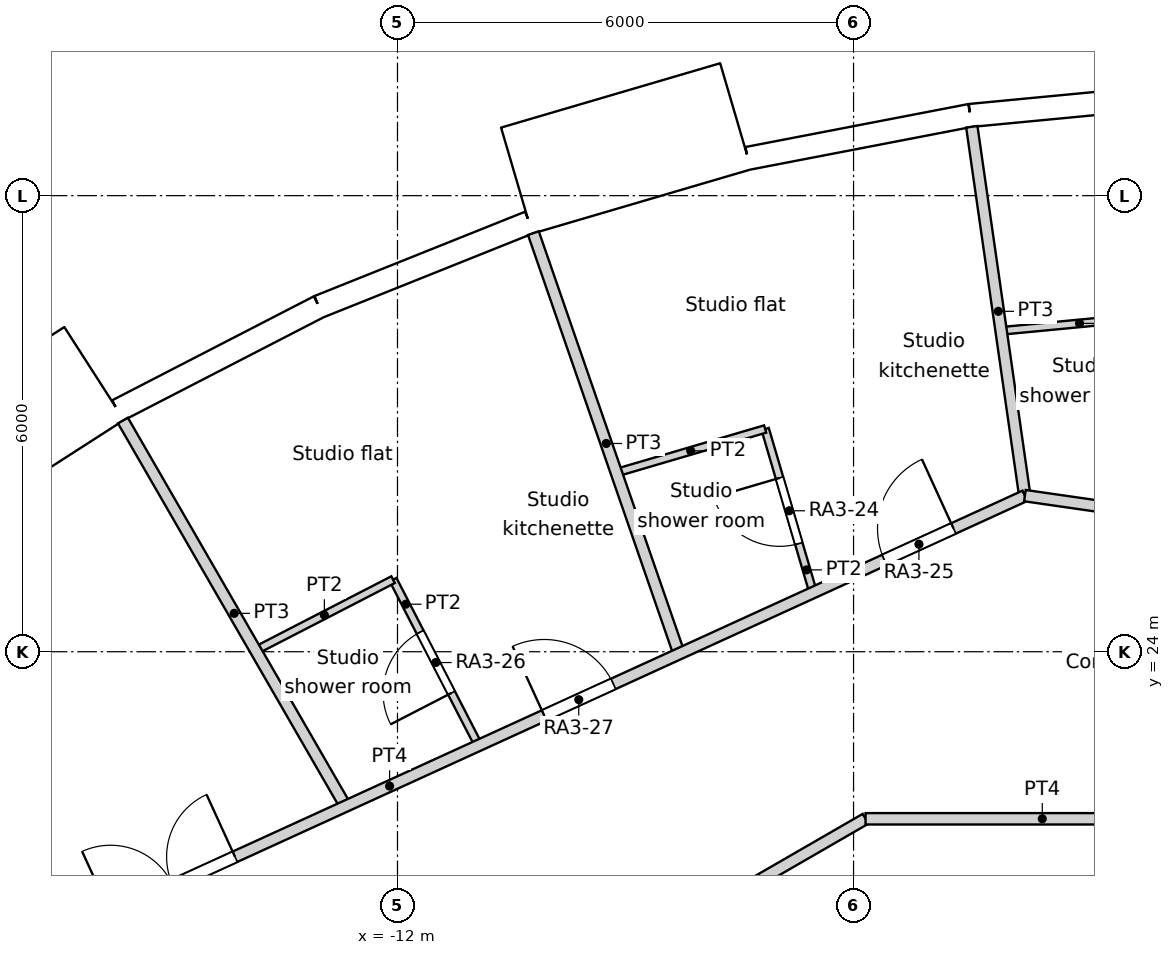
"""IFC4 building model, lengths in metres.
Left out: names, types, materials, properties, quantities, classifications, styles, units other than length and angle.
Written with IfcOpenShell. Run it as: python <this file> out.ifc"""

import sys

from ifc_helpers import new_model, si_unit, direction, frame, frame_2d, origin, origin_2d, place, context, subcontext, project, spatial, rectangle, circle, extrude, element, fill, save


model = new_model("IFC4")
c1 = context("Model", 3, precision=1e-05, world=origin(), true_north=direction((0.0, 1.0)))
c2 = subcontext(c1, "Body", "Model", "MODEL_VIEW")
j1 = project(units=[si_unit("LENGTHUNIT", "METRE"), si_unit("PLANEANGLEUNIT", "RADIAN")], contexts=[c1])
p1 = place(None, origin())
s1 = spatial("IfcSite", under=j1, at=p1, CompositionType="ELEMENT")
p2 = place(p1, origin())
s2 = spatial("IfcBuilding", under=s1, at=p2, CompositionType="ELEMENT")
p3 = place(p2, frame((0.0, 0.0, 49.8)))
s3 = spatial("IfcBuildingStorey", under=s2, at=p3, CompositionType="ELEMENT", Elevation=49.8)
for number, where, z_axis, x_axis in (
    (1, (-4.309, 29.966, 0.0), (0.0, 0.0, 1.0), (1.0, 0.0, 0.0)),
    (2, (-9.902, 28.61, 0.0), (0.0, 0.0, 1.0), (1.0, 0.0, 0.0)),
    (3, (-15.137, 26.219, 0.0), (0.0, 0.0, 1.0), (1.0, 0.0, 0.0)),
):
    element("IfcColumn", number, at=place(p3, frame(where, z_axis=z_axis, x_axis=x_axis)), inside=s3, PredefinedType="COLUMN", context=c2, shape_type="SweptSolid", body=[
        extrude(circle(Radius=0.7, at=origin_2d()), origin(), (0.0, 0.0, 1.0), 3.6),
    ])
for number, where, z_axis, x_axis in (
    (4, (-7.04, 23.516, 0.0), (0.0, 0.0, 1.0), (1.0, 0.0, 0.0)),
    (5, (-12.274, 21.259, 0.0), (0.0, 0.0, 1.0), (1.0, 0.0, 0.0)),
):
    element("IfcColumn", number, at=place(p3, frame(where, z_axis=z_axis, x_axis=x_axis)), inside=s3, PredefinedType="COLUMN", context=c2, shape_type="SweptSolid", body=[
        extrude(circle(Radius=0.75, at=origin_2d()), origin(), (0.0, 0.0, 1.0), 3.6),
    ])
p4 = place(p3, frame((-1.499, 31.338, 0.0), z_axis=(0.0, 0.0, 1.0), x_axis=(-0.995473351551, -0.095041077185, 0.0)))
e6 = element("IfcWall", 6, at=p4, inside=s3, PredefinedType="SOLIDWALL", context=c2, shape_type="SweptSolid", body=[
    extrude(rectangle(XDim=2.98, YDim=0.3, at=frame_2d((1.49, 0.0))), origin(), (0.0, 0.0, 1.0), 3.15),
])
p5 = place(p4, frame((1.49, 0.0, 1.55)))
e7 = element("IfcOpeningElement", 7, at=p5, cuts=e6, PredefinedType="OPENING", context=c2, shape_type="SweptSolid", body=[
    extrude(circle(Radius=0.9, at=origin_2d()), frame((0.0, 0.16, 0.0), z_axis=(0.0, -1.0, 0.0), x_axis=(1.0, 0.0, 0.0)), (0.0, 0.0, 1.0), 0.32),
])
p6 = place(p3, frame((-4.465, 31.055, 0.0), z_axis=(0.0, 0.0, 1.0), x_axis=(-0.981924535406, -0.189272836848, 0.0)))
e8 = element("IfcWall", 8, at=p6, inside=s3, PredefinedType="SOLIDWALL", context=c2, shape_type="SweptSolid", body=[
    extrude(rectangle(XDim=2.98, YDim=0.3, at=frame_2d((1.49, 0.0))), origin(), (0.0, 0.0, 1.0), 3.15),
])
p7 = place(p6, frame((1.49, 0.0, 1.55)))
e9 = element("IfcOpeningElement", 9, at=p7, cuts=e8, PredefinedType="OPENING", context=c2, shape_type="SweptSolid", body=[
    extrude(circle(Radius=0.9, at=origin_2d()), frame((0.0, 0.16, 0.0), z_axis=(0.0, -1.0, 0.0), x_axis=(1.0, 0.0, 0.0)), (0.0, 0.0, 1.0), 0.32),
])
p8 = place(p3, frame((-7.552, 31.044, -0.45), z_axis=(0.0, 0.0, 1.0), x_axis=(-0.959489813418, -0.281743319258, 0.0)))
e10 = element("IfcWall", 10, at=p8, inside=s3, PredefinedType="ELEMENTEDWALL", context=c2, shape_type="SweptSolid", body=[
    extrude(rectangle(XDim=3.0, YDim=1.45, at=frame_2d((1.5, 0.0))), origin(), (0.0, 0.0, 1.0), 3.6),
])
p9 = place(p8, frame((1.5, 0.0, 2.0)))
e11 = element("IfcOpeningElement", 11, at=p9, cuts=e10, PredefinedType="OPENING", context=c2, shape_type="SweptSolid", body=[
    extrude(circle(Radius=0.9, at=origin_2d()), frame((0.0, 0.735, 0.0), z_axis=(0.0, -1.0, 0.0), x_axis=(1.0, 0.0, 0.0)), (0.0, 0.0, 1.0), 1.47),
])
p10 = place(p3, frame((-10.267, 29.646, 0.0), z_axis=(0.0, 0.0, 1.0), x_axis=(-0.928403213937, -0.371574316054, 0.0)))
e12 = element("IfcWall", 12, at=p10, inside=s3, PredefinedType="SOLIDWALL", context=c2, shape_type="SweptSolid", body=[
    extrude(rectangle(XDim=2.98, YDim=0.3, at=frame_2d((1.49, 0.0))), origin(), (0.0, 0.0, 1.0), 3.15),
])
p11 = place(p10, frame((1.49, 0.0, 1.55)))
e13 = element("IfcOpeningElement", 13, at=p11, cuts=e12, PredefinedType="OPENING", context=c2, shape_type="SweptSolid", body=[
    extrude(circle(Radius=0.9, at=origin_2d()), frame((0.0, 0.16, 0.0), z_axis=(0.0, -1.0, 0.0), x_axis=(1.0, 0.0, 0.0)), (0.0, 0.0, 1.0), 0.32),
])
p12 = place(p3, frame((-13.033, 28.539, 0.0), z_axis=(0.0, 0.0, 1.0), x_axis=(-0.888819853856, -0.458256770153, 0.0)))
e14 = element("IfcWall", 14, at=p12, inside=s3, PredefinedType="SOLIDWALL", context=c2, shape_type="SweptSolid", body=[
    extrude(rectangle(XDim=2.98, YDim=0.3, at=frame_2d((1.49, 0.0))), origin(), (0.0, 0.0, 1.0), 3.15),
])
p13 = place(p12, frame((1.49, 0.0, 1.55)))
e15 = element("IfcOpeningElement", 15, at=p13, cuts=e14, PredefinedType="OPENING", context=c2, shape_type="SweptSolid", body=[
    extrude(circle(Radius=0.9, at=origin_2d()), frame((0.0, 0.16, 0.0), z_axis=(0.0, -1.0, 0.0), x_axis=(1.0, 0.0, 0.0)), (0.0, 0.0, 1.0), 0.32),
])
p14 = place(p3, frame((-15.992, 27.659, -0.45), z_axis=(0.0, 0.0, 1.0), x_axis=(-0.841223422347, -0.540687667415, 0.0)))
e16 = element("IfcWall", 16, at=p14, inside=s3, PredefinedType="ELEMENTEDWALL", context=c2, shape_type="SweptSolid", body=[
    extrude(rectangle(XDim=3.0, YDim=1.45, at=frame_2d((1.5, 0.0))), origin(), (0.0, 0.0, 1.0), 3.6),
])
p15 = place(p14, frame((1.5, 0.0, 2.0)))
e17 = element("IfcOpeningElement", 17, at=p15, cuts=e16, PredefinedType="OPENING", context=c2, shape_type="SweptSolid", body=[
    extrude(circle(Radius=0.9, at=origin_2d()), frame((0.0, 0.735, 0.0), z_axis=(0.0, -1.0, 0.0), x_axis=(1.0, 0.0, 0.0)), (0.0, 0.0, 1.0), 1.47),
])
p16 = place(p3, frame((-5.842, 21.802, 0.0), z_axis=(0.0, 0.0, 1.0), x_axis=(1.0, 0.0, 0.0)))
e18 = element("IfcWall", 18, at=p16, inside=s3, PredefinedType="PARTITIONING", context=c2, shape_type="SweptSolid", body=[
    extrude(rectangle(XDim=4.65, YDim=0.15, at=frame_2d((2.325, 0.0))), origin(), (0.0, 0.0, 1.0), 3.15),
])
p17 = place(p3, frame((-14.0, 17.092, 0.0), z_axis=(0.0, 0.0, 1.0), x_axis=(0.86602719091, 0.499996904595, 0.0)))
e19 = element("IfcWall", 19, at=p17, inside=s3, PredefinedType="PARTITIONING", context=c2, shape_type="SweptSolid", body=[
    extrude(rectangle(XDim=9.42, YDim=0.15, at=frame_2d((4.71, 0.0))), origin(), (0.0, 0.0, 1.0), 3.15),
])
p18 = place(p3, frame((-3.746, 26.054, 0.0), z_axis=(0.0, 0.0, 1.0), x_axis=(0.989780545379, -0.142598990138, 0.0)))
e20 = element("IfcWall", 20, at=p18, inside=s3, PredefinedType="PARTITIONING", context=c2, shape_type="SweptSolid", body=[
    extrude(rectangle(XDim=14.83, YDim=0.15, at=frame_2d((7.415, 0.0))), origin(), (0.0, 0.0, 1.0), 3.15),
])
p19 = place(p18, frame((10.817, 0.0, 0.0)))
e21 = element("IfcOpeningElement", 21, at=p19, cuts=e20, PredefinedType="OPENING", context=c2, shape_type="SweptSolid", body=[
    extrude(rectangle(XDim=1.0, YDim=2.1, at=frame_2d((0.5, 1.05))), frame((0.0, 0.075, 0.0), z_axis=(0.0, -1.0, 0.0), x_axis=(1.0, 0.0, 0.0)), (0.0, 0.0, 1.0), 0.15),
])
p20 = place(p18, frame((5.954, 0.0, 0.0)))
e22 = element("IfcOpeningElement", 22, at=p20, cuts=e20, PredefinedType="OPENING", context=c2, shape_type="SweptSolid", body=[
    extrude(rectangle(XDim=1.0, YDim=2.1, at=frame_2d((0.5, 1.05))), frame((0.0, 0.075, 0.0), z_axis=(0.0, -1.0, 0.0), x_axis=(1.0, 0.0, 0.0)), (0.0, 0.0, 1.0), 0.15),
])
p21 = place(p18, frame((3.314, 0.0, 0.0)))
e23 = element("IfcOpeningElement", 23, at=p21, cuts=e20, PredefinedType="OPENING", context=c2, shape_type="SweptSolid", body=[
    extrude(rectangle(XDim=1.0, YDim=2.1, at=frame_2d((0.5, 1.05))), frame((0.0, 0.075, 0.0), z_axis=(0.0, -1.0, 0.0), x_axis=(1.0, 0.0, 0.0)), (0.0, 0.0, 1.0), 0.15),
])
p22 = place(p3, frame((-17.234, 19.888, 0.0), z_axis=(0.0, 0.0, 1.0), x_axis=(0.90953867323, 0.415619299238, 0.0)))
e24 = element("IfcWall", 24, at=p22, inside=s3, PredefinedType="PARTITIONING", context=c2, shape_type="SweptSolid", body=[
    extrude(rectangle(XDim=14.829, YDim=0.15, at=frame_2d((7.415, 0.0))), origin(), (0.0, 0.0, 1.0), 3.15),
])
p23 = place(p22, frame((12.797, 0.0, 0.0)))
e25 = element("IfcOpeningElement", 25, at=p23, cuts=e24, PredefinedType="OPENING", context=c2, shape_type="SweptSolid", body=[
    extrude(rectangle(XDim=1.0, YDim=2.1, at=frame_2d((0.5, 1.05))), frame((0.0, 0.075, 0.0), z_axis=(0.0, -1.0, 0.0), x_axis=(1.0, 0.0, 0.0)), (0.0, 0.0, 1.0), 0.15),
])
p24 = place(p22, frame((7.877, 0.0, 0.0)))
e26 = element("IfcOpeningElement", 26, at=p24, cuts=e24, PredefinedType="OPENING", context=c2, shape_type="SweptSolid", body=[
    extrude(rectangle(XDim=1.0, YDim=2.1, at=frame_2d((0.5, 1.05))), frame((0.0, 0.075, 0.0), z_axis=(0.0, -1.0, 0.0), x_axis=(1.0, 0.0, 0.0)), (0.0, 0.0, 1.0), 0.15),
])
p25 = place(p22, frame((1.604, 0.0, 0.0)))
e27 = element("IfcOpeningElement", 27, at=p25, cuts=e24, PredefinedType="OPENING", context=c2, shape_type="SweptSolid", body=[
    extrude(rectangle(XDim=1.8, YDim=2.1, at=frame_2d((0.9, 1.05))), frame((0.0, 0.075, 0.0), z_axis=(0.0, -1.0, 0.0), x_axis=(1.0, 0.0, 0.0)), (0.0, 0.0, 1.0), 0.15),
])
p26 = place(p3, frame((-4.058, 28.221, 0.0), z_axis=(0.0, 0.0, 1.0), x_axis=(0.995466291052, 0.095115000814, 0.0)))
e28 = element("IfcWall", 28, at=p26, inside=s3, PredefinedType="PARTITIONING", context=c2, shape_type="SweptSolid", body=[
    extrude(rectangle(XDim=2.071, YDim=0.1, at=frame_2d((1.036, 0.0))), origin(), (0.0, 0.0, 1.0), 3.15),
])
p27 = place(p3, frame((-4.444, 30.906, 0.0), z_axis=(0.0, 0.0, 1.0), x_axis=(0.142104219222, -0.989851701458, 0.0)))
e29 = element("IfcWall", 29, at=p27, inside=s3, PredefinedType="PARTITIONING", context=c2, shape_type="SweptSolid", body=[
    extrude(rectangle(XDim=4.905, YDim=0.15, at=frame_2d((2.453, 0.0))), origin(), (0.0, 0.0, 1.0), 3.15),
])
p28 = place(p3, frame((-7.163, 26.93, 0.0), z_axis=(0.0, 0.0, 1.0), x_axis=(0.281948165188, -0.959429638977, 0.0)))
e30 = element("IfcWall", 30, at=p28, inside=s3, PredefinedType="PARTITIONING", context=c2, shape_type="SweptSolid", body=[
    extrude(rectangle(XDim=2.242, YDim=0.1, at=frame_2d((1.121, 0.0))), origin(), (0.0, 0.0, 1.0), 3.15),
])
p29 = place(p28, frame((0.671, 0.0, 0.0)))
e31 = element("IfcOpeningElement", 31, at=p29, cuts=e30, PredefinedType="OPENING", context=c2, shape_type="SweptSolid", body=[
    extrude(rectangle(XDim=0.9, YDim=2.04, at=frame_2d((0.45, 1.02))), frame((0.0, 0.05, 0.0), z_axis=(0.0, -1.0, 0.0), x_axis=(1.0, 0.0, 0.0)), (0.0, 0.0, 1.0), 0.1),
])
p30 = place(p3, frame((-9.121, 26.355, 0.0), z_axis=(0.0, 0.0, 1.0), x_axis=(0.95948923736, 0.281745281045, 0.0)))
e32 = element("IfcWall", 32, at=p30, inside=s3, PredefinedType="PARTITIONING", context=c2, shape_type="SweptSolid", body=[
    extrude(rectangle(XDim=2.041, YDim=0.1, at=frame_2d((1.021, 0.0))), origin(), (0.0, 0.0, 1.0), 3.15),
])
p31 = place(p3, frame((-10.212, 29.507, 0.0), z_axis=(0.0, 0.0, 1.0), x_axis=(0.327223665968, -0.944946915139, 0.0)))
e33 = element("IfcWall", 33, at=p31, inside=s3, PredefinedType="PARTITIONING", context=c2, shape_type="SweptSolid", body=[
    extrude(rectangle(XDim=5.857, YDim=0.15, at=frame_2d((2.928, 0.0))), origin(), (0.0, 0.0, 1.0), 3.15),
])
p32 = place(p3, frame((-12.058, 24.948, 0.0), z_axis=(0.0, 0.0, 1.0), x_axis=(0.458287904527, -0.888803800939, 0.0)))
e34 = element("IfcWall", 34, at=p32, inside=s3, PredefinedType="PARTITIONING", context=c2, shape_type="SweptSolid", body=[
    extrude(rectangle(XDim=2.453, YDim=0.1, at=frame_2d((1.226, 0.0))), origin(), (0.0, 0.0, 1.0), 3.15),
])
p33 = place(p32, frame((0.777, 0.0, 0.0)))
e35 = element("IfcOpeningElement", 35, at=p33, cuts=e34, PredefinedType="OPENING", context=c2, shape_type="SweptSolid", body=[
    extrude(rectangle(XDim=0.9, YDim=2.04, at=frame_2d((0.45, 1.02))), frame((0.0, 0.05, 0.0), z_axis=(0.0, -1.0, 0.0), x_axis=(1.0, 0.0, 0.0)), (0.0, 0.0, 1.0), 0.1),
])
p34 = place(p3, frame((-13.866, 24.016, 0.0), z_axis=(0.0, 0.0, 1.0), x_axis=(0.888861985525, 0.45817504372, 0.0)))
e36 = element("IfcWall", 36, at=p34, inside=s3, PredefinedType="PARTITIONING", context=c2, shape_type="SweptSolid", body=[
    extrude(rectangle(XDim=2.034, YDim=0.1, at=frame_2d((1.017, 0.0))), origin(), (0.0, 0.0, 1.0), 3.15),
])
p35 = place(p3, frame((-15.612, 27.041, 0.0), z_axis=(0.0, 0.0, 1.0), x_axis=(0.499905289531, -0.866080077994, 0.0)))
e37 = element("IfcWall", 37, at=p35, inside=s3, PredefinedType="PARTITIONING", context=c2, shape_type="SweptSolid", body=[
    extrude(rectangle(XDim=5.857, YDim=0.15, at=frame_2d((2.928, 0.0))), origin(), (0.0, 0.0, 1.0), 3.15),
])
p36 = place(p5, origin())
e38 = element("IfcWindow", 38, at=p36, inside=s3, PartitioningType="SINGLE_PANEL", PredefinedType="WINDOW", context=c2, shape_type="SweptSolid", body=[
    extrude(circle(Radius=0.9, at=origin_2d()), frame((0.0, 0.12, 0.0), z_axis=(0.0, -1.0, 0.0), x_axis=(1.0, 0.0, 0.0)), (0.0, 0.0, 1.0), 0.1),
])
fill(e7, e38)
p37 = place(p7, origin())
e39 = element("IfcWindow", 39, at=p37, inside=s3, PartitioningType="SINGLE_PANEL", PredefinedType="WINDOW", context=c2, shape_type="SweptSolid", body=[
    extrude(circle(Radius=0.9, at=origin_2d()), frame((0.0, 0.12, 0.0), z_axis=(0.0, -1.0, 0.0), x_axis=(1.0, 0.0, 0.0)), (0.0, 0.0, 1.0), 0.1),
])
fill(e9, e39)
p38 = place(p9, origin())
e40 = element("IfcWindow", 40, at=p38, inside=s3, PartitioningType="SINGLE_PANEL", PredefinedType="WINDOW", context=c2, shape_type="SweptSolid", body=[
    extrude(circle(Radius=0.9, at=origin_2d()), frame((0.0, 0.695, 0.0), z_axis=(0.0, -1.0, 0.0), x_axis=(1.0, 0.0, 0.0)), (0.0, 0.0, 1.0), 0.1),
])
fill(e11, e40)
p39 = place(p11, origin())
e41 = element("IfcWindow", 41, at=p39, inside=s3, PartitioningType="SINGLE_PANEL", PredefinedType="WINDOW", context=c2, shape_type="SweptSolid", body=[
    extrude(circle(Radius=0.9, at=origin_2d()), frame((0.0, 0.12, 0.0), z_axis=(0.0, -1.0, 0.0), x_axis=(1.0, 0.0, 0.0)), (0.0, 0.0, 1.0), 0.1),
])
fill(e13, e41)
p40 = place(p13, origin())
e42 = element("IfcWindow", 42, at=p40, inside=s3, PartitioningType="SINGLE_PANEL", PredefinedType="WINDOW", context=c2, shape_type="SweptSolid", body=[
    extrude(circle(Radius=0.9, at=origin_2d()), frame((0.0, 0.12, 0.0), z_axis=(0.0, -1.0, 0.0), x_axis=(1.0, 0.0, 0.0)), (0.0, 0.0, 1.0), 0.1),
])
fill(e15, e42)
p41 = place(p15, origin())
e43 = element("IfcWindow", 43, at=p41, inside=s3, PartitioningType="SINGLE_PANEL", PredefinedType="WINDOW", context=c2, shape_type="SweptSolid", body=[
    extrude(circle(Radius=0.9, at=origin_2d()), frame((0.0, 0.695, 0.0), z_axis=(0.0, -1.0, 0.0), x_axis=(1.0, 0.0, 0.0)), (0.0, 0.0, 1.0), 0.1),
])
fill(e17, e43)
p42 = place(p29, origin())
e44 = element("IfcDoor", 44, at=p42, inside=s3, OperationType="SINGLE_SWING_RIGHT", PredefinedType="DOOR", context=c2, shape_type="SweptSolid", body=[
    extrude(rectangle(XDim=0.9, YDim=2.04, at=frame_2d((0.45, 1.02))), frame((0.0, 0.025, 0.0), z_axis=(0.0, -1.0, 0.0), x_axis=(1.0, 0.0, 0.0)), (0.0, 0.0, 1.0), 0.05),
])
fill(e31, e44)
p43 = place(p23, origin())
e45 = element("IfcDoor", 45, at=p43, inside=s3, OperationType="SINGLE_SWING_RIGHT", PredefinedType="DOOR", context=c2, shape_type="SweptSolid", body=[
    extrude(rectangle(XDim=1.0, YDim=2.1, at=frame_2d((0.5, 1.05))), frame((0.0, 0.025, 0.0), z_axis=(0.0, -1.0, 0.0), x_axis=(1.0, 0.0, 0.0)), (0.0, 0.0, 1.0), 0.05),
])
fill(e25, e45)
p44 = place(p33, origin())
e46 = element("IfcDoor", 46, at=p44, inside=s3, OperationType="SINGLE_SWING_LEFT", PredefinedType="DOOR", context=c2, shape_type="SweptSolid", body=[
    extrude(rectangle(XDim=0.9, YDim=2.04, at=frame_2d((0.45, 1.02))), frame((0.0, 0.025, 0.0), z_axis=(0.0, -1.0, 0.0), x_axis=(1.0, 0.0, 0.0)), (0.0, 0.0, 1.0), 0.05),
])
fill(e35, e46)
p45 = place(p24, origin())
e47 = element("IfcDoor", 47, at=p45, inside=s3, OperationType="SINGLE_SWING_LEFT", PredefinedType="DOOR", context=c2, shape_type="SweptSolid", body=[
    extrude(rectangle(XDim=1.0, YDim=2.1, at=frame_2d((0.5, 1.05))), frame((0.0, 0.025, 0.0), z_axis=(0.0, -1.0, 0.0), x_axis=(1.0, 0.0, 0.0)), (0.0, 0.0, 1.0), 0.05),
])
fill(e26, e47)
p46 = place(p25, origin())
e48 = element("IfcDoor", 48, at=p46, inside=s3, OperationType="DOUBLE_DOOR_SINGLE_SWING", PredefinedType="DOOR", context=c2, shape_type="SweptSolid", body=[
    extrude(rectangle(XDim=1.8, YDim=2.1, at=frame_2d((0.9, 1.05))), frame((0.0, 0.025, 0.0), z_axis=(0.0, -1.0, 0.0), x_axis=(1.0, 0.0, 0.0)), (0.0, 0.0, 1.0), 0.05),
])
fill(e27, e48)
save(model, sys.argv[1])
